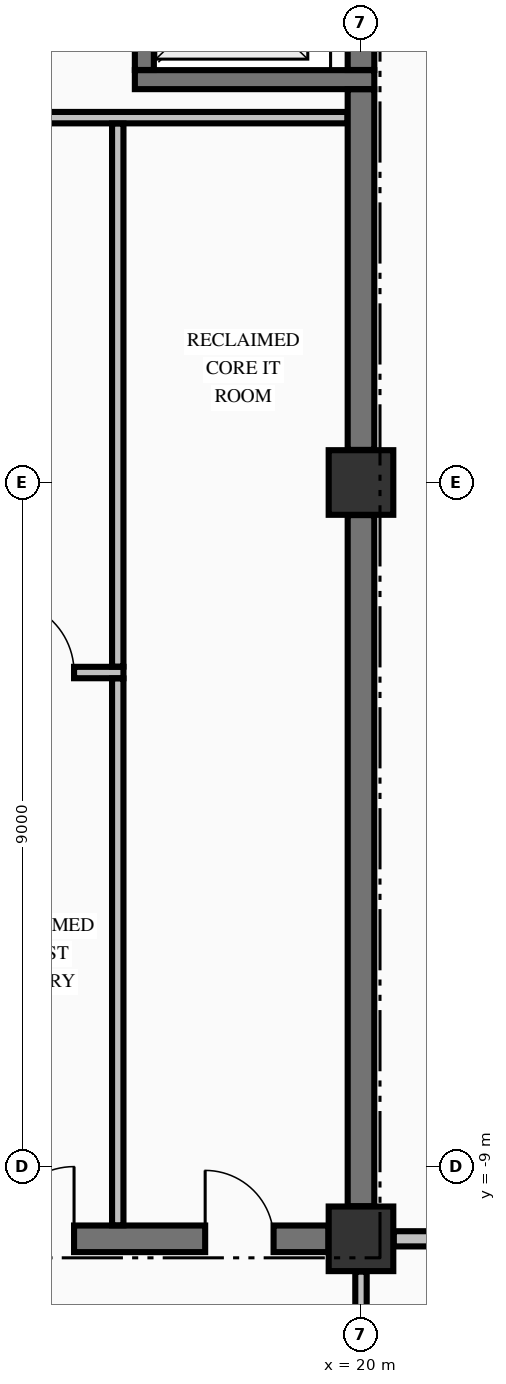
"""IFC4 building model, lengths in metres.
Left out: names, types, materials, properties, quantities, classifications, styles, units other than length and angle.
Written with IfcOpenShell. Run it as: python <this file> out.ifc"""

import sys

from ifc_helpers import new_model, si_unit, direction, frame, frame_2d, origin, origin_2d, place, context, subcontext, project, spatial, rectangle, extrude, element, fill, save


model = new_model("IFC4")
c1 = context("Model", 3, precision=1e-05, world=origin(), true_north=direction((0.0, 1.0)))
c2 = subcontext(c1, "Body", "Model", "MODEL_VIEW")
j1 = project(units=[si_unit("LENGTHUNIT", "METRE"), si_unit("PLANEANGLEUNIT", "RADIAN")], contexts=[c1])
p1 = place(None, origin())
s1 = spatial("IfcSite", under=j1, at=p1, CompositionType="ELEMENT")
p2 = place(p1, origin())
s2 = spatial("IfcBuilding", under=s1, at=p2, CompositionType="ELEMENT")
p3 = place(p2, frame((0.0, 0.0, 176.26)))
s3 = spatial("IfcBuildingStorey", under=s2, at=p3, CompositionType="ELEMENT", Elevation=176.26)
for number, where, z_axis, x_axis in (
    (1, (20.0, -9.95, -0.275), (0.0, 0.0, 1.0), (1.0, 0.0, 0.0)),
    (2, (20.0, 0.0, -0.275), (0.0, 0.0, 1.0), (1.0, 0.0, 0.0)),
):
    element("IfcColumn", number, at=place(p3, frame(where, z_axis=z_axis, x_axis=x_axis)), inside=s3, PredefinedType="COLUMN", context=c2, shape_type="SweptSolid", body=[
        extrude(rectangle(XDim=0.85, YDim=0.85, at=origin_2d()), origin(), (0.0, 0.0, 1.0), 3.425),
    ])
p4 = place(p3, frame((14.7, -9.95, 0.0), z_axis=(0.0, 0.0, 1.0), x_axis=(1.0, 0.0, 0.0)))
e3 = element("IfcWall", 3, at=p4, inside=s3, PredefinedType="SHEAR", context=c2, shape_type="SweptSolid", body=[
    extrude(rectangle(XDim=4.871, YDim=0.35, at=frame_2d((2.436, 0.0))), origin(), (0.0, 0.0, 1.0), 3.15),
])
p5 = place(p4, frame((3.25, 0.0, 0.0)))
e4 = element("IfcOpeningElement", 4, at=p5, cuts=e3, PredefinedType="OPENING", context=c2, shape_type="SweptSolid", body=[
    extrude(rectangle(XDim=0.9, YDim=2.15, at=frame_2d((0.45, 1.075))), frame((0.0, 0.185, 0.0), z_axis=(0.0, -1.0, 0.0), x_axis=(1.0, 0.0, 0.0)), (0.0, 0.0, 1.0), 0.37),
])
p6 = place(p4, frame((0.575, 0.0, 0.0)))
e5 = element("IfcOpeningElement", 5, at=p6, cuts=e3, PredefinedType="OPENING", context=c2, shape_type="SweptSolid", body=[
    extrude(rectangle(XDim=0.95, YDim=2.15, at=frame_2d((0.475, 1.075))), frame((0.0, 0.185, 0.0), z_axis=(0.0, -1.0, 0.0), x_axis=(1.0, 0.0, 0.0)), (0.0, 0.0, 1.0), 0.37),
])
p7 = place(p3, frame((17.025, 5.3, 0.0), z_axis=(0.0, 0.0, 1.0), x_axis=(1.0, 0.0, 0.0)))
e6 = element("IfcWall", 6, at=p7, inside=s3, PredefinedType="SOLIDWALL", context=c2, shape_type="SweptSolid", body=[
    extrude(rectangle(XDim=3.15, YDim=0.25, at=frame_2d((1.575, 0.0))), origin(), (0.0, 0.0, 1.0), 3.15),
])
p8 = place(p3, frame((20.431, -9.95, 0.0), z_axis=(0.0, 0.0, 1.0), x_axis=(1.0, 0.0, 0.0)))
e7 = element("IfcWall", 7, at=p8, inside=s3, PredefinedType="PARTITIONING", context=c2, shape_type="SweptSolid", body=[
    extrude(rectangle(XDim=6.404, YDim=0.2, at=frame_2d((3.202, 0.0))), origin(), (0.0, 0.0, 1.0), 3.15),
])
p9 = place(p3, frame((14.878, -2.5, 0.0), z_axis=(0.0, 0.0, 1.0), x_axis=(1.0, 0.0, 0.0)))
e8 = element("IfcWall", 8, at=p9, inside=s3, PredefinedType="PARTITIONING", context=c2, shape_type="SweptSolid", body=[
    extrude(rectangle(XDim=1.997, YDim=0.15, at=frame_2d((0.999, 0.0))), origin(), (0.0, 0.0, 1.0), 3.15),
])
p10 = place(p9, frame((0.397, 0.0, 0.0)))
e9 = element("IfcOpeningElement", 9, at=p10, cuts=e8, PredefinedType="OPENING", context=c2, shape_type="SweptSolid", body=[
    extrude(rectangle(XDim=0.95, YDim=2.15, at=frame_2d((0.475, 1.075))), frame((0.0, 0.085, 0.0), z_axis=(0.0, -1.0, 0.0), x_axis=(1.0, 0.0, 0.0)), (0.0, 0.0, 1.0), 0.17),
])
p11 = place(p3, frame((14.878, 4.8, 0.0), z_axis=(0.0, 0.0, 1.0), x_axis=(1.0, 0.0, 0.0)))
e10 = element("IfcWall", 10, at=p11, inside=s3, PredefinedType="PARTITIONING", context=c2, shape_type="SweptSolid", body=[
    extrude(rectangle(XDim=4.944, YDim=0.15, at=frame_2d((2.472, 0.0))), origin(), (0.0, 0.0, 1.0), 3.15),
])
p12 = place(p3, frame((17.15, 5.427, 0.0), z_axis=(0.0, 0.0, 1.0), x_axis=(0.0, 1.0, 0.0)))
e11 = element("IfcWall", 11, at=p12, inside=s3, PredefinedType="SOLIDWALL", context=c2, shape_type="SweptSolid", body=[
    extrude(rectangle(XDim=2.196, YDim=0.25, at=frame_2d((1.098, 0.0))), origin(), (0.0, 0.0, 1.0), 3.15),
])
p13 = place(p12, frame((0.548, 0.0, 0.0)))
e12 = element("IfcOpeningElement", 12, at=p13, cuts=e11, PredefinedType="OPENING", context=c2, shape_type="SweptSolid", body=[
    extrude(rectangle(XDim=1.1, YDim=2.2, at=frame_2d((0.55, 1.1))), frame((0.0, 0.135, 0.0), z_axis=(0.0, -1.0, 0.0), x_axis=(1.0, 0.0, 0.0)), (0.0, 0.0, 1.0), 0.27),
])
p14 = place(p3, frame((20.0, -9.521, 0.0), z_axis=(0.0, 0.0, 1.0), x_axis=(0.0, 1.0, 0.0)))
e13 = element("IfcWall", 13, at=p14, inside=s3, PredefinedType="SHEAR", context=c2, shape_type="SweptSolid", body=[
    extrude(rectangle(XDim=9.092, YDim=0.35, at=frame_2d((4.546, 0.0))), origin(), (0.0, 0.0, 1.0), 3.15),
])
p15 = place(p3, frame((20.0, 0.429, 0.0), z_axis=(0.0, 0.0, 1.0), x_axis=(0.0, 1.0, 0.0)))
e14 = element("IfcWall", 14, at=p15, inside=s3, PredefinedType="SHEAR", context=c2, shape_type="SweptSolid", body=[
    extrude(rectangle(XDim=4.744, YDim=0.35, at=frame_2d((2.372, 0.0))), origin(), (0.0, 0.0, 1.0), 3.15),
])
p16 = place(p3, frame((20.0, 5.427, 0.0), z_axis=(0.0, 0.0, 1.0), x_axis=(0.0, 1.0, 0.0)))
e15 = element("IfcWall", 15, at=p16, inside=s3, PredefinedType="SHEAR", context=c2, shape_type="SweptSolid", body=[
    extrude(rectangle(XDim=2.196, YDim=0.35, at=frame_2d((1.098, 0.0))), origin(), (0.0, 0.0, 1.0), 3.15),
])
p17 = place(p3, frame((16.8, -9.772, 0.0), z_axis=(0.0, 0.0, 1.0), x_axis=(0.0, 1.0, 0.0)))
e16 = element("IfcWall", 16, at=p17, inside=s3, PredefinedType="PARTITIONING", context=c2, shape_type="SweptSolid", body=[
    extrude(rectangle(XDim=7.194, YDim=0.15, at=frame_2d((3.597, 0.0))), origin(), (0.0, 0.0, 1.0), 3.15),
])
p18 = place(p3, frame((16.8, -2.422, 0.0), z_axis=(0.0, 0.0, 1.0), x_axis=(0.0, 1.0, 0.0)))
e17 = element("IfcWall", 17, at=p18, inside=s3, PredefinedType="PARTITIONING", context=c2, shape_type="SweptSolid", body=[
    extrude(rectangle(XDim=7.144, YDim=0.15, at=frame_2d((3.572, 0.0))), origin(), (0.0, 0.0, 1.0), 3.15),
])
p19 = place(p3, frame((20.0, -12.697, 0.0), z_axis=(0.0, 0.0, 1.0), x_axis=(0.0, 1.0, 0.0)))
e18 = element("IfcWall", 18, at=p19, inside=s3, PredefinedType="PARTITIONING", context=c2, shape_type="SweptSolid", body=[
    extrude(rectangle(XDim=2.316, YDim=0.15, at=frame_2d((1.158, 0.0))), origin(), (0.0, 0.0, 1.0), 2.342),
])
p20 = place(p5, origin())
e19 = element("IfcDoor", 19, at=p20, inside=s3, OperationType="SINGLE_SWING_LEFT", PredefinedType="DOOR", context=c2, shape_type="SweptSolid", body=[
    extrude(rectangle(XDim=0.9, YDim=2.15, at=frame_2d((0.45, 1.075))), frame((0.0, 0.025, 0.0), z_axis=(0.0, -1.0, 0.0), x_axis=(1.0, 0.0, 0.0)), (0.0, 0.0, 1.0), 0.05),
])
fill(e4, e19)
p21 = place(p6, origin())
e20 = element("IfcDoor", 20, at=p21, inside=s3, OperationType="SINGLE_SWING_RIGHT", PredefinedType="DOOR", context=c2, shape_type="SweptSolid", body=[
    extrude(rectangle(XDim=0.95, YDim=2.15, at=frame_2d((0.475, 1.075))), frame((0.0, 0.025, 0.0), z_axis=(0.0, -1.0, 0.0), x_axis=(1.0, 0.0, 0.0)), (0.0, 0.0, 1.0), 0.05),
])
fill(e5, e20)
p22 = place(p10, origin())
e21 = element("IfcDoor", 21, at=p22, inside=s3, OperationType="SINGLE_SWING_LEFT", PredefinedType="DOOR", context=c2, shape_type="SweptSolid", body=[
    extrude(rectangle(XDim=0.95, YDim=2.15, at=frame_2d((0.475, 1.075))), frame((0.0, 0.025, 0.0), z_axis=(0.0, -1.0, 0.0), x_axis=(1.0, 0.0, 0.0)), (0.0, 0.0, 1.0), 0.05),
])
fill(e9, e21)
save(model, sys.argv[1])
